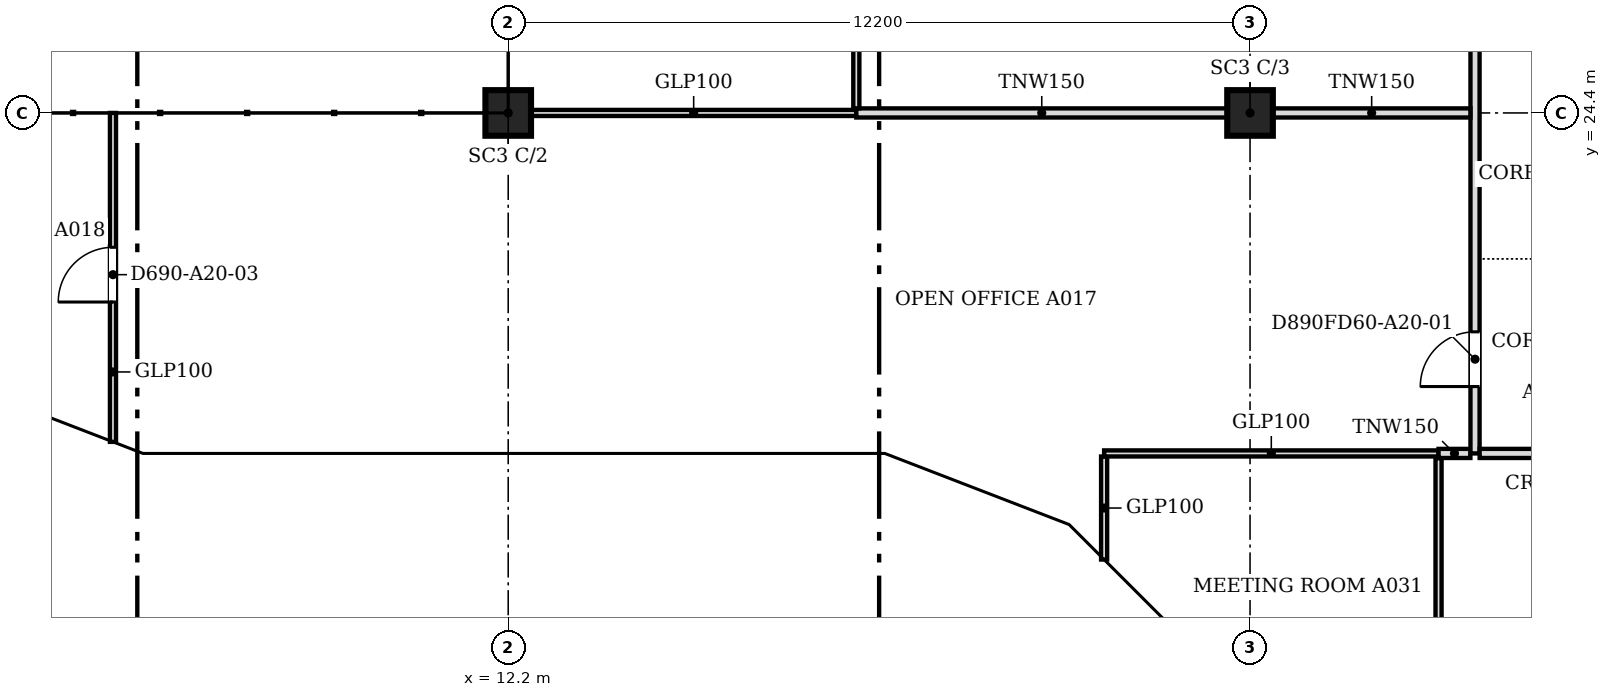
"""IFC4 building model, lengths in metres.
Left out: names, types, materials, properties, quantities, classifications, styles, units other than length and angle.
Written with IfcOpenShell. Run it as: python <this file> out.ifc"""

import sys

from ifc_helpers import new_model, si_unit, direction, frame, frame_2d, origin, origin_2d, place, context, subcontext, project, spatial, polyline, rectangle, outline, extrude, faceted_brep, source, transform, mapped, element, fill, save


model = new_model("IFC4")
c1 = context("Model", 3, precision=1e-05, world=origin(), true_north=direction((0.0, 1.0)))
c2 = subcontext(c1, "Body", "Model", "MODEL_VIEW")
j1 = project(units=[si_unit("LENGTHUNIT", "METRE"), si_unit("PLANEANGLEUNIT", "RADIAN")], contexts=[c1])
p1 = place(None, origin())
s1 = spatial("IfcSite", under=j1, at=p1, CompositionType="ELEMENT")
p2 = place(p1, origin())
s2 = spatial("IfcBuilding", under=s1, at=p2, CompositionType="ELEMENT")
p3 = place(p2, frame((0.0, 0.0, 220.7)))
s3 = spatial("IfcBuildingStorey", under=s2, at=p3, CompositionType="ELEMENT", Elevation=220.7)
for number, where, z_axis, x_axis in (
    (1, (12.2, 24.4, 0.0), (0.0, 0.0, 1.0), (1.0, 0.0, 0.0)),
    (2, (24.4, 24.4, 0.0), (0.0, 0.0, 1.0), (1.0, 0.0, 0.0)),
):
    element("IfcColumn", number, at=place(p3, frame(where, z_axis=z_axis, x_axis=x_axis)), inside=s3, PredefinedType="COLUMN", context=c2, shape_type="SweptSolid", body=[
        extrude(rectangle(XDim=0.75, YDim=0.75, at=origin_2d()), origin(), (0.0, 0.0, 1.0), 3.6),
    ])
m1 = source(origin(), c2, "Body", "Brep", [
    faceted_brep([(2.95, -0.25, 0.0), (2.997, -0.25, 0.059), (2.997, -0.25, 7.541), (2.95, -0.25, 7.6), (0.0, -0.25, 3.8), (0.053, 0.25, 3.868), (2.904, 0.25, 7.54), (2.904, 0.25, 0.06), (0.053, 0.25, 3.732), (2.95, 0.0, 0.0), (2.95, 0.0, 7.6), (0.0, 0.0, 3.8)], [[[0, 1, 2, 3, 4]], [[5, 6, 7, 8]], [[1, 0, 9]], [[10, 3, 2]], [[6, 5, 11, 4, 3, 10]], [[8, 7, 9, 0, 4, 11]], [[8, 11, 5]], [[1, 9, 7, 6, 10, 2]]]),
])
p4 = place(p3, frame((3.394, 19.612, -3.8), z_axis=(0.0, 0.0, 1.0), x_axis=(0.932990326376, -0.359901446078, 0.0)))
e3 = element("IfcWall", 3, at=p4, inside=s3, PredefinedType="SOLIDWALL", context=c2, shape_type="MappedRepresentation", body=[
    mapped(m1, transform((0.0, 0.0, 0.0), scale=1.0)),
])
m2 = source(origin(), c2, "Body", "SweptSolid", [
    extrude(outline(polyline([(2.75, 6.935), (0.316, 3.8), (2.75, 0.665), (2.75, 6.935)])), frame((0.0, 0.26, 0.0), z_axis=(0.0, -1.0, 0.0), x_axis=(1.0, 0.0, 0.0)), (0.0, 0.0, 1.0), 0.52),
])
p5 = place(p4, origin())
e4 = element("IfcOpeningElement", 4, at=p5, cuts=e3, PredefinedType="OPENING", context=c2, shape_type="MappedRepresentation", body=[
    mapped(m2, transform((0.0, 0.0, 0.0), scale=1.0)),
])
m3 = source(origin(), c2, "Body", "Brep", [
    faceted_brep([(0.047, -0.25, 0.0), (3.05, -0.25, 3.8), (0.047, -0.25, 7.6), (0.0, -0.25, 7.54), (0.0, -0.25, 0.06), (0.093, 0.25, 7.541), (3.05, 0.25, 3.8), (0.093, 0.25, 0.059), (0.047, 0.0, 0.0), (0.047, 0.0, 7.6)], [[[0, 1, 2, 3, 4]], [[5, 6, 7]], [[7, 6, 1, 0, 8]], [[6, 5, 9, 2, 1]], [[3, 2, 9]], [[8, 0, 4]], [[7, 8, 4, 3, 9, 5]]]),
])
p6 = place(p3, frame((6.1, 18.55, -3.8), z_axis=(0.0, 0.0, 1.0), x_axis=(1.0, 0.0, 0.0)))
e5 = element("IfcWall", 5, at=p6, inside=s3, PredefinedType="SOLIDWALL", context=c2, shape_type="MappedRepresentation", body=[
    mapped(m3, transform((0.0, 0.0, 0.0), scale=1.0)),
])
m4 = source(origin(), c2, "Body", "SweptSolid", [
    extrude(outline(polyline([(0.247, 0.656), (2.731, 3.8), (0.247, 6.944), (0.247, 0.656)])), frame((0.0, 0.26, 0.0), z_axis=(0.0, -1.0, 0.0), x_axis=(1.0, 0.0, 0.0)), (0.0, 0.0, 1.0), 0.52),
])
p7 = place(p6, origin())
e6 = element("IfcOpeningElement", 6, at=p7, cuts=e5, PredefinedType="OPENING", context=c2, shape_type="MappedRepresentation", body=[
    mapped(m4, transform((0.0, 0.0, 0.0), scale=1.0)),
])
m5 = source(origin(), c2, "Body", "SweptSolid", [
    extrude(outline(polyline([(3.05, 0.0), (6.1, 3.8), (3.05, 7.6), (0.0, 3.8), (3.05, 0.0)])), frame((0.0, 0.25, 0.0), z_axis=(0.0, -1.0, 0.0), x_axis=(1.0, 0.0, 0.0)), (0.0, 0.0, 1.0), 0.5),
])
p8 = place(p3, frame((9.15, 18.55, -3.8), z_axis=(0.0, 0.0, 1.0), x_axis=(1.0, 0.0, 0.0)))
e7 = element("IfcWall", 7, at=p8, inside=s3, PredefinedType="SOLIDWALL", context=c2, shape_type="MappedRepresentation", body=[
    mapped(m5, transform((0.0, 0.0, 0.0), scale=1.0)),
])
m6 = source(origin(), c2, "Body", "SweptSolid", [
    extrude(outline(polyline([(3.05, 0.399), (5.78, 3.8), (3.05, 7.201), (0.321, 3.8), (3.05, 0.399)])), frame((0.0, 0.26, 0.0), z_axis=(0.0, -1.0, 0.0), x_axis=(1.0, 0.0, 0.0)), (0.0, 0.0, 1.0), 0.52),
])
p9 = place(p8, origin())
e8 = element("IfcOpeningElement", 8, at=p9, cuts=e7, PredefinedType="OPENING", context=c2, shape_type="MappedRepresentation", body=[
    mapped(m6, transform((0.0, 0.0, 0.0), scale=1.0)),
])
m7 = source(origin(), c2, "Body", "Brep", [
    faceted_brep([(3.05, -0.25, 7.543), (0.0, -0.25, 3.8), (3.05, -0.25, 0.057), (0.0, 0.25, 3.8), (3.096, 0.25, 7.6), (3.143, 0.25, 7.544), (3.143, 0.25, 0.056), (3.096, 0.25, 0.0), (3.096, -0.0, 0.0), (3.096, -0.0, 7.6)], [[[0, 1, 2]], [[3, 4, 5, 6, 7]], [[7, 6, 8]], [[5, 4, 9]], [[4, 3, 1, 0, 9]], [[3, 7, 8, 2, 1]], [[2, 8, 6, 5, 9, 0]]]),
])
p10 = place(p3, frame((15.25, 18.55, -3.8), z_axis=(0.0, 0.0, 1.0), x_axis=(1.0, 0.0, 0.0)))
e9 = element("IfcWall", 9, at=p10, inside=s3, PredefinedType="SOLIDWALL", context=c2, shape_type="MappedRepresentation", body=[
    mapped(m7, transform((0.0, 0.0, 0.0), scale=1.0)),
])
m8 = source(origin(), c2, "Body", "SweptSolid", [
    extrude(outline(polyline([(2.896, 6.959), (0.323, 3.8), (2.896, 0.641), (2.896, 6.959)])), frame((0.0, 0.26, 0.0), z_axis=(0.0, -1.0, 0.0), x_axis=(1.0, 0.0, 0.0)), (0.0, 0.0, 1.0), 0.52),
])
p11 = place(p10, origin())
e10 = element("IfcOpeningElement", 10, at=p11, cuts=e9, PredefinedType="OPENING", context=c2, shape_type="MappedRepresentation", body=[
    mapped(m8, transform((0.0, 0.0, 0.0), scale=1.0)),
])
m9 = source(origin(), c2, "Body", "Brep", [
    faceted_brep([(0.093, -0.25, 0.056), (3.143, -0.25, 3.736), (3.143, -0.25, 3.864), (0.093, -0.25, 7.544), (0.0, 0.25, 7.543), (0.047, 0.25, 7.6), (3.196, 0.25, 3.8), (0.047, 0.25, 0.0), (0.0, 0.25, 0.057), (3.196, -0.0, 3.8), (0.047, 0.0, 0.0), (0.047, 0.0, 7.6)], [[[0, 1, 2, 3]], [[4, 5, 6, 7, 8]], [[7, 6, 9, 1, 0, 10]], [[6, 5, 11, 3, 2, 9]], [[5, 4, 11]], [[8, 7, 10]], [[8, 10, 0, 3, 11, 4]], [[1, 9, 2]]]),
])
p12 = place(p3, frame((18.303, 18.567, -3.8), z_axis=(0.0, 0.0, 1.0), x_axis=(0.932978940178, -0.359930961693, 0.0)))
e11 = element("IfcWall", 11, at=p12, inside=s3, PredefinedType="SOLIDWALL", context=c2, shape_type="MappedRepresentation", body=[
    mapped(m9, transform((0.0, 0.0, 0.0), scale=1.0)),
])
m10 = source(origin(), c2, "Body", "SweptSolid", [
    extrude(outline(polyline([(0.247, 0.633), (2.871, 3.8), (0.247, 6.967), (0.247, 0.633)])), frame((0.0, 0.26, 0.0), z_axis=(0.0, -1.0, 0.0), x_axis=(1.0, 0.0, 0.0)), (0.0, 0.0, 1.0), 0.52),
])
p13 = place(p12, origin())
e12 = element("IfcOpeningElement", 12, at=p13, cuts=e11, PredefinedType="OPENING", context=c2, shape_type="MappedRepresentation", body=[
    mapped(m10, transform((0.0, 0.0, 0.0), scale=1.0)),
])
m11 = source(origin(), c2, "Body", "Brep", [
    faceted_brep([(3.103, -0.25, 7.536), (0.053, -0.25, 3.864), (0.053, -0.25, 3.736), (3.103, -0.25, 0.064), (0.0, 0.25, 3.8), (3.156, 0.25, 7.6), (3.209, 0.25, 7.536), (3.209, 0.25, 0.064), (3.156, 0.25, 0.0), (3.156, -0.0, 0.0), (3.156, -0.0, 7.6), (0.0, 0.0, 3.8)], [[[0, 1, 2, 3]], [[4, 5, 6, 7, 8]], [[8, 7, 9]], [[6, 5, 10]], [[5, 4, 11, 1, 0, 10]], [[4, 8, 9, 3, 2, 11]], [[11, 2, 1]], [[3, 9, 7, 6, 10, 0]]]),
])
p14 = place(p3, frame((21.285, 17.417, -3.8), z_axis=(0.0, 0.0, 1.0), x_axis=(0.707106781187, -0.707106781187, 0.0)))
e13 = element("IfcWall", 13, at=p14, inside=s3, PredefinedType="SOLIDWALL", context=c2, shape_type="MappedRepresentation", body=[
    mapped(m11, transform((0.0, 0.0, 0.0), scale=1.0)),
])
m12 = source(origin(), c2, "Body", "SweptSolid", [
    extrude(outline(polyline([(2.956, 6.968), (0.325, 3.8), (2.956, 0.632), (2.956, 6.968)])), frame((0.0, 0.26, 0.0), z_axis=(0.0, -1.0, 0.0), x_axis=(1.0, 0.0, 0.0)), (0.0, 0.0, 1.0), 0.52),
])
p15 = place(p14, origin())
e14 = element("IfcOpeningElement", 14, at=p15, cuts=e13, PredefinedType="OPENING", context=c2, shape_type="MappedRepresentation", body=[
    mapped(m12, transform((0.0, 0.0, 0.0), scale=1.0)),
])
p16 = place(p2, frame((0.0, 0.0, 224.5)))
s4 = spatial("IfcBuildingStorey", under=s2, at=p16, CompositionType="ELEMENT", Elevation=224.5)
m13 = source(origin(), c2, "Body", "Brep", [
    faceted_brep([(0.053, -0.25, 0.0), (3.003, -0.25, 3.8), (0.053, -0.25, 7.6), (0.0, -0.25, 7.532), (0.0, -0.25, 0.068), (0.106, 0.25, 7.532), (2.957, 0.25, 3.86), (2.957, 0.25, 3.74), (0.106, 0.25, 0.068), (3.003, 0.0, 3.8), (0.053, 0.0, 0.0), (0.053, 0.0, 7.6)], [[[0, 1, 2, 3, 4]], [[5, 6, 7, 8]], [[8, 7, 9, 1, 0, 10]], [[6, 5, 11, 2, 1, 9]], [[3, 2, 11]], [[10, 0, 4]], [[8, 10, 4, 3, 11, 5]], [[9, 7, 6]]]),
])
p17 = place(p16, frame((3.344, 19.631, -3.8), z_axis=(0.0, 0.0, 1.0), x_axis=(0.933007896601, -0.359855894603, 0.0)))
e15 = element("IfcWall", 15, at=p17, inside=s4, PredefinedType="SOLIDWALL", context=c2, shape_type="MappedRepresentation", body=[
    mapped(m13, transform((0.0, 0.0, 0.0), scale=1.0)),
])
m14 = source(origin(), c2, "Body", "SweptSolid", [
    extrude(outline(polyline([(0.253, 0.665), (2.687, 3.8), (0.253, 6.935), (0.253, 0.665)])), frame((0.0, 0.26, 0.0), z_axis=(0.0, -1.0, 0.0), x_axis=(1.0, 0.0, 0.0)), (0.0, 0.0, 1.0), 0.52),
])
p18 = place(p17, origin())
e16 = element("IfcOpeningElement", 16, at=p18, cuts=e15, PredefinedType="OPENING", context=c2, shape_type="MappedRepresentation", body=[
    mapped(m14, transform((0.0, 0.0, 0.0), scale=1.0)),
])
m15 = source(origin(), c2, "Body", "Brep", [
    faceted_brep([(3.003, -0.25, 0.0), (6.053, -0.25, 3.8), (3.003, -0.25, 7.6), (0.0, -0.25, 3.8), (0.047, 0.25, 3.859), (3.003, 0.25, 7.6), (6.053, 0.25, 3.8), (3.003, 0.25, 0.0), (0.047, 0.25, 3.741), (0.0, 0.0, 3.8)], [[[0, 1, 2, 3]], [[4, 5, 6, 7, 8]], [[7, 6, 1, 0]], [[6, 5, 2, 1]], [[5, 4, 9, 3, 2]], [[8, 7, 0, 3, 9]], [[8, 9, 4]]]),
])
p19 = place(p16, frame((6.146, 18.55, -3.8), z_axis=(0.0, 0.0, 1.0), x_axis=(1.0, 0.0, 0.0)))
e17 = element("IfcWall", 17, at=p19, inside=s4, PredefinedType="SOLIDWALL", context=c2, shape_type="MappedRepresentation", body=[
    mapped(m15, transform((0.0, 0.0, 0.0), scale=1.0)),
])
m16 = source(origin(), c2, "Body", "SweptSolid", [
    extrude(outline(polyline([(3.005, 0.401), (5.733, 3.8), (3.005, 7.199), (0.319, 3.8), (3.005, 0.401)])), frame((0.0, 0.26, 0.0), z_axis=(0.0, -1.0, 0.0), x_axis=(1.0, 0.0, 0.0)), (0.0, 0.0, 1.0), 0.52),
])
p20 = place(p19, origin())
e18 = element("IfcOpeningElement", 18, at=p20, cuts=e17, PredefinedType="OPENING", context=c2, shape_type="MappedRepresentation", body=[
    mapped(m16, transform((0.0, 0.0, 0.0), scale=1.0)),
])
m17 = source(origin(), c2, "Body", "Brep", [
    faceted_brep([(3.05, -0.25, 0.0), (6.1, -0.25, 3.743), (6.1, -0.25, 3.857), (3.05, -0.25, 7.6), (0.0, -0.25, 3.8), (0.0, 0.25, 3.8), (3.05, 0.25, 7.6), (6.146, 0.25, 3.8), (3.05, 0.25, 0.0), (6.146, -0.0, 3.8)], [[[0, 1, 2, 3, 4]], [[5, 6, 7, 8]], [[8, 7, 9, 1, 0]], [[7, 6, 3, 2, 9]], [[6, 5, 4, 3]], [[5, 8, 0, 4]], [[1, 9, 2]]]),
])
p21 = place(p16, frame((12.2, 18.55, -3.8), z_axis=(0.0, 0.0, 1.0), x_axis=(1.0, 0.0, 0.0)))
e19 = element("IfcWall", 19, at=p21, inside=s4, PredefinedType="SOLIDWALL", context=c2, shape_type="MappedRepresentation", body=[
    mapped(m17, transform((0.0, 0.0, 0.0), scale=1.0)),
])
m18 = source(origin(), c2, "Body", "SweptSolid", [
    extrude(outline(polyline([(3.052, 0.398), (5.824, 3.8), (3.052, 7.202), (0.321, 3.8), (3.052, 0.398)])), frame((0.0, 0.26, 0.0), z_axis=(0.0, -1.0, 0.0), x_axis=(1.0, 0.0, 0.0)), (0.0, 0.0, 1.0), 0.52),
])
p22 = place(p21, origin())
e20 = element("IfcOpeningElement", 20, at=p22, cuts=e19, PredefinedType="OPENING", context=c2, shape_type="MappedRepresentation", body=[
    mapped(m18, transform((0.0, 0.0, 0.0), scale=1.0)),
])
m19 = source(origin(), c2, "Body", "Brep", [
    faceted_brep([(3.096, -0.25, 7.536), (0.047, -0.25, 3.856), (0.047, -0.25, 3.744), (3.096, -0.25, 0.064), (0.0, 0.25, 3.8), (3.149, 0.25, 7.6), (3.202, 0.25, 7.536), (3.202, 0.25, 0.064), (3.149, 0.25, 0.0), (3.149, -0.0, 0.0), (3.149, -0.0, 7.6), (0.0, 0.0, 3.8)], [[[0, 1, 2, 3]], [[4, 5, 6, 7, 8]], [[8, 7, 9]], [[6, 5, 10]], [[5, 4, 11, 1, 0, 10]], [[4, 8, 9, 3, 2, 11]], [[11, 2, 1]], [[3, 9, 7, 6, 10, 0]]]),
])
p23 = place(p16, frame((18.346, 18.55, -3.8), z_axis=(0.0, 0.0, 1.0), x_axis=(0.932985567668, -0.359913782069, 0.0)))
e21 = element("IfcWall", 21, at=p23, inside=s4, PredefinedType="SOLIDWALL", context=c2, shape_type="MappedRepresentation", body=[
    mapped(m19, transform((0.0, 0.0, 0.0), scale=1.0)),
])
m20 = source(origin(), c2, "Body", "SweptSolid", [
    extrude(outline(polyline([(2.949, 6.967), (0.325, 3.8), (2.949, 0.633), (2.949, 6.967)])), frame((0.0, 0.26, 0.0), z_axis=(0.0, -1.0, 0.0), x_axis=(1.0, 0.0, 0.0)), (0.0, 0.0, 1.0), 0.52),
])
p24 = place(p23, origin())
e22 = element("IfcOpeningElement", 22, at=p24, cuts=e21, PredefinedType="OPENING", context=c2, shape_type="MappedRepresentation", body=[
    mapped(m20, transform((0.0, 0.0, 0.0), scale=1.0)),
])
m21 = source(origin(), c2, "Body", "Brep", [
    faceted_brep([(0.106, -0.25, 0.064), (3.156, -0.25, 3.736), (3.156, -0.25, 3.864), (0.106, -0.25, 7.536), (0.0, 0.25, 7.536), (0.053, 0.25, 7.6), (3.209, 0.25, 3.8), (0.053, 0.25, 0.0), (0.0, 0.25, 0.064), (3.209, -0.0, 3.8), (0.053, 0.0, 0.0), (0.053, 0.0, 7.6)], [[[0, 1, 2, 3]], [[4, 5, 6, 7, 8]], [[7, 6, 9, 1, 0, 10]], [[6, 5, 11, 3, 2, 9]], [[5, 4, 11]], [[8, 7, 10]], [[8, 10, 0, 3, 11, 4]], [[1, 9, 2]]]),
])
p25 = place(p16, frame((21.248, 17.454, -3.8), z_axis=(0.0, 0.0, 1.0), x_axis=(0.707106781187, -0.707106781187, 0.0)))
e23 = element("IfcWall", 23, at=p25, inside=s4, PredefinedType="SOLIDWALL", context=c2, shape_type="MappedRepresentation", body=[
    mapped(m21, transform((0.0, 0.0, 0.0), scale=1.0)),
])
m22 = source(origin(), c2, "Body", "SweptSolid", [
    extrude(outline(polyline([(0.253, 0.632), (2.884, 3.8), (0.253, 6.968), (0.253, 0.632)])), frame((0.0, 0.26, 0.0), z_axis=(0.0, -1.0, 0.0), x_axis=(1.0, 0.0, 0.0)), (0.0, 0.0, 1.0), 0.52),
])
p26 = place(p25, origin())
e24 = element("IfcOpeningElement", 24, at=p26, cuts=e23, PredefinedType="OPENING", context=c2, shape_type="MappedRepresentation", body=[
    mapped(m22, transform((0.0, 0.0, 0.0), scale=1.0)),
])
p27 = place(p3, frame((27.5, 10.276, 0.0), z_axis=(0.0, 0.0, 1.0), x_axis=(0.0, 1.0, 0.0)))
e25 = element("IfcWall", 25, at=p27, inside=s3, PredefinedType="PARTITIONING", context=c2, shape_type="SweptSolid", body=[
    extrude(rectangle(XDim=8.448, YDim=0.1, at=frame_2d((4.224, 0.0))), origin(), (0.0, 0.0, 1.0), 3.067),
])
m23 = source(origin(), c2, "Body", "SweptSolid", [
    extrude(rectangle(XDim=0.9, YDim=2.1, at=frame_2d((0.45, 1.05))), frame((0.0, 0.06, 0.0), z_axis=(0.0, -1.0, 0.0), x_axis=(1.0, 0.0, 0.0)), (0.0, 0.0, 1.0), 0.12),
])
p28 = place(p27, frame((3.8, 0.0, 0.0)))
e26 = element("IfcOpeningElement", 26, at=p28, cuts=e25, PredefinedType="OPENING", context=c2, shape_type="MappedRepresentation", body=[
    mapped(m23, transform((0.0, 0.0, 0.0), scale=1.0)),
])
p29 = place(p3, frame((22.0, 17.055, 0.0), z_axis=(0.0, 0.0, 1.0), x_axis=(0.0, 1.0, 0.0)))
e27 = element("IfcWall", 27, at=p29, inside=s3, PredefinedType="PARTITIONING", context=c2, shape_type="SweptSolid", body=[
    extrude(rectangle(XDim=1.694, YDim=0.1, at=frame_2d((0.847, 0.0))), origin(), (0.0, 0.0, 1.0), 3.067),
])
p30 = place(p3, frame((22.0, 18.8, 0.0), z_axis=(0.0, 0.0, 1.0), x_axis=(1.0, 0.0, 0.0)))
e28 = element("IfcWall", 28, at=p30, inside=s3, PredefinedType="PARTITIONING", context=c2, shape_type="SweptSolid", body=[
    extrude(rectangle(XDim=5.499, YDim=0.1, at=frame_2d((2.75, 0.0))), origin(), (0.0, 0.0, 1.0), 3.067),
])
p31 = place(p3, frame((27.5, 18.8, 0.0), z_axis=(0.0, 0.0, 1.0), x_axis=(1.0, 0.0, 0.0)))
e29 = element("IfcWall", 29, at=p31, inside=s3, PredefinedType="PARTITIONING", context=c2, shape_type="SweptSolid", body=[
    extrude(rectangle(XDim=0.524, YDim=0.15, at=frame_2d((0.262, 0.0))), origin(), (0.0, 0.0, 1.0), 3.067),
])
p32 = place(p3, frame((28.1, 18.8, 0.0), z_axis=(0.0, 0.0, 1.0), x_axis=(0.0, 1.0, 0.0)))
e30 = element("IfcWall", 30, at=p32, inside=s3, PredefinedType="PARTITIONING", context=c2, shape_type="SweptSolid", body=[
    extrude(rectangle(XDim=26.424, YDim=0.15, at=frame_2d((13.212, 0.0))), origin(), (0.0, 0.0, 1.0), 3.067),
])
m24 = source(origin(), c2, "Body", "SweptSolid", [
    extrude(rectangle(XDim=0.9, YDim=2.1, at=frame_2d((0.45, 1.05))), frame((0.0, 0.085, 0.0), z_axis=(0.0, -1.0, 0.0), x_axis=(1.0, 0.0, 0.0)), (0.0, 0.0, 1.0), 0.17),
])
p33 = place(p32, frame((1.1, 0.0, 0.0)))
e31 = element("IfcOpeningElement", 31, at=p33, cuts=e30, PredefinedType="OPENING", context=c2, shape_type="MappedRepresentation", body=[
    mapped(m24, transform((0.0, 0.0, 0.0), scale=1.0)),
])
p34 = place(p32, frame((23.151, 0.0, 0.0)))
e32 = element("IfcOpeningElement", 32, at=p34, cuts=e30, PredefinedType="OPENING", context=c2, shape_type="MappedRepresentation", body=[
    mapped(m24, transform((0.0, 0.0, 0.0), scale=1.0)),
])
p35 = place(p32, frame((8.2, 0.0, 0.0)))
e33 = element("IfcOpeningElement", 33, at=p35, cuts=e30, PredefinedType="OPENING", context=c2, shape_type="MappedRepresentation", body=[
    mapped(m24, transform((0.0, 0.0, 0.0), scale=1.0)),
])
p36 = place(p32, frame((15.8, 0.0, 0.0)))
e34 = element("IfcOpeningElement", 34, at=p36, cuts=e30, PredefinedType="OPENING", context=c2, shape_type="MappedRepresentation", body=[
    mapped(m24, transform((0.0, 0.0, 0.0), scale=1.0)),
])
p37 = place(p3, frame((28.176, 18.8, 0.0), z_axis=(0.0, 0.0, 1.0), x_axis=(1.0, 0.0, 0.0)))
e35 = element("IfcWall", 35, at=p37, inside=s3, PredefinedType="PARTITIONING", context=c2, shape_type="SweptSolid", body=[
    extrude(rectangle(XDim=2.248, YDim=0.15, at=frame_2d((1.124, 0.0))), origin(), (0.0, 0.0, 1.0), 3.067),
])
p38 = place(p3, frame((5.7, 18.99, 0.0), z_axis=(0.0, 0.0, 1.0), x_axis=(0.0, 1.0, 0.0)))
e36 = element("IfcWall", 36, at=p38, inside=s3, PredefinedType="PARTITIONING", context=c2, shape_type="SweptSolid", body=[
    extrude(rectangle(XDim=5.41, YDim=0.1, at=frame_2d((2.705, 0.0))), origin(), (0.0, 0.0, 1.0), 3.067),
])
p39 = place(p38, frame((2.3, 0.0, 0.0)))
e37 = element("IfcOpeningElement", 37, at=p39, cuts=e36, PredefinedType="OPENING", context=c2, shape_type="MappedRepresentation", body=[
    mapped(m23, transform((0.0, 0.0, 0.0), scale=1.0)),
])
p40 = place(p3, frame((12.576, 24.4, 0.0), z_axis=(0.0, 0.0, 1.0), x_axis=(1.0, 0.0, 0.0)))
e38 = element("IfcWall", 38, at=p40, inside=s3, PredefinedType="PARTITIONING", context=c2, shape_type="SweptSolid", body=[
    extrude(rectangle(XDim=5.348, YDim=0.1, at=frame_2d((2.674, 0.0))), origin(), (0.0, 0.0, 1.0), 3.067),
])
p41 = place(p3, frame((17.925, 24.4, 0.0), z_axis=(0.0, 0.0, 1.0), x_axis=(1.0, 0.0, 0.0)))
e39 = element("IfcWall", 39, at=p41, inside=s3, PredefinedType="PARTITIONING", context=c2, shape_type="SweptSolid", body=[
    extrude(rectangle(XDim=6.099, YDim=0.15, at=frame_2d((3.049, 0.0))), origin(), (0.0, 0.0, 1.0), 3.067),
])
p42 = place(p3, frame((24.776, 24.4, 0.0), z_axis=(0.0, 0.0, 1.0), x_axis=(1.0, 0.0, 0.0)))
e40 = element("IfcWall", 40, at=p42, inside=s3, PredefinedType="PARTITIONING", context=c2, shape_type="SweptSolid", body=[
    extrude(rectangle(XDim=3.248, YDim=0.15, at=frame_2d((1.624, 0.0))), origin(), (0.0, 0.0, 1.0), 3.067),
])
p43 = place(p3, frame((17.925, 24.476, 0.0), z_axis=(0.0, 0.0, 1.0), x_axis=(0.0, 1.0, 0.0)))
e41 = element("IfcWall", 41, at=p43, inside=s3, PredefinedType="PARTITIONING", context=c2, shape_type="SweptSolid", body=[
    extrude(rectangle(XDim=5.948, YDim=0.1, at=frame_2d((2.974, 0.0))), origin(), (0.0, 0.0, 1.0), 3.067),
])
p44 = place(p43, frame((2.5, 0.0, 0.0)))
e42 = element("IfcOpeningElement", 42, at=p44, cuts=e41, PredefinedType="OPENING", context=c2, shape_type="MappedRepresentation", body=[
    mapped(m23, transform((0.0, 0.0, 0.0), scale=1.0)),
])
m25 = source(origin(), c2, "Body", "SweptSolid", [
    extrude(rectangle(XDim=0.9, YDim=2.1, at=frame_2d((0.45, 1.05))), frame((0.0, 0.025, 0.0), z_axis=(0.0, -1.0, 0.0), x_axis=(1.0, 0.0, 0.0)), (0.0, 0.0, 1.0), 0.05),
])
p45 = place(p33, origin())
e43 = element("IfcDoor", 43, at=p45, inside=s3, OperationType="SINGLE_SWING_LEFT", PredefinedType="DOOR", context=c2, shape_type="MappedRepresentation", body=[
    mapped(m25, transform((0.0, 0.0, 0.0), scale=1.0)),
])
fill(e31, e43)
p46 = place(p39, origin())
e44 = element("IfcDoor", 44, at=p46, inside=s3, OperationType="SINGLE_SWING_LEFT", PredefinedType="DOOR", context=c2, shape_type="MappedRepresentation", body=[
    mapped(m25, transform((0.0, 0.0, 0.0), scale=1.0)),
])
fill(e37, e44)
save(model, sys.argv[1])
